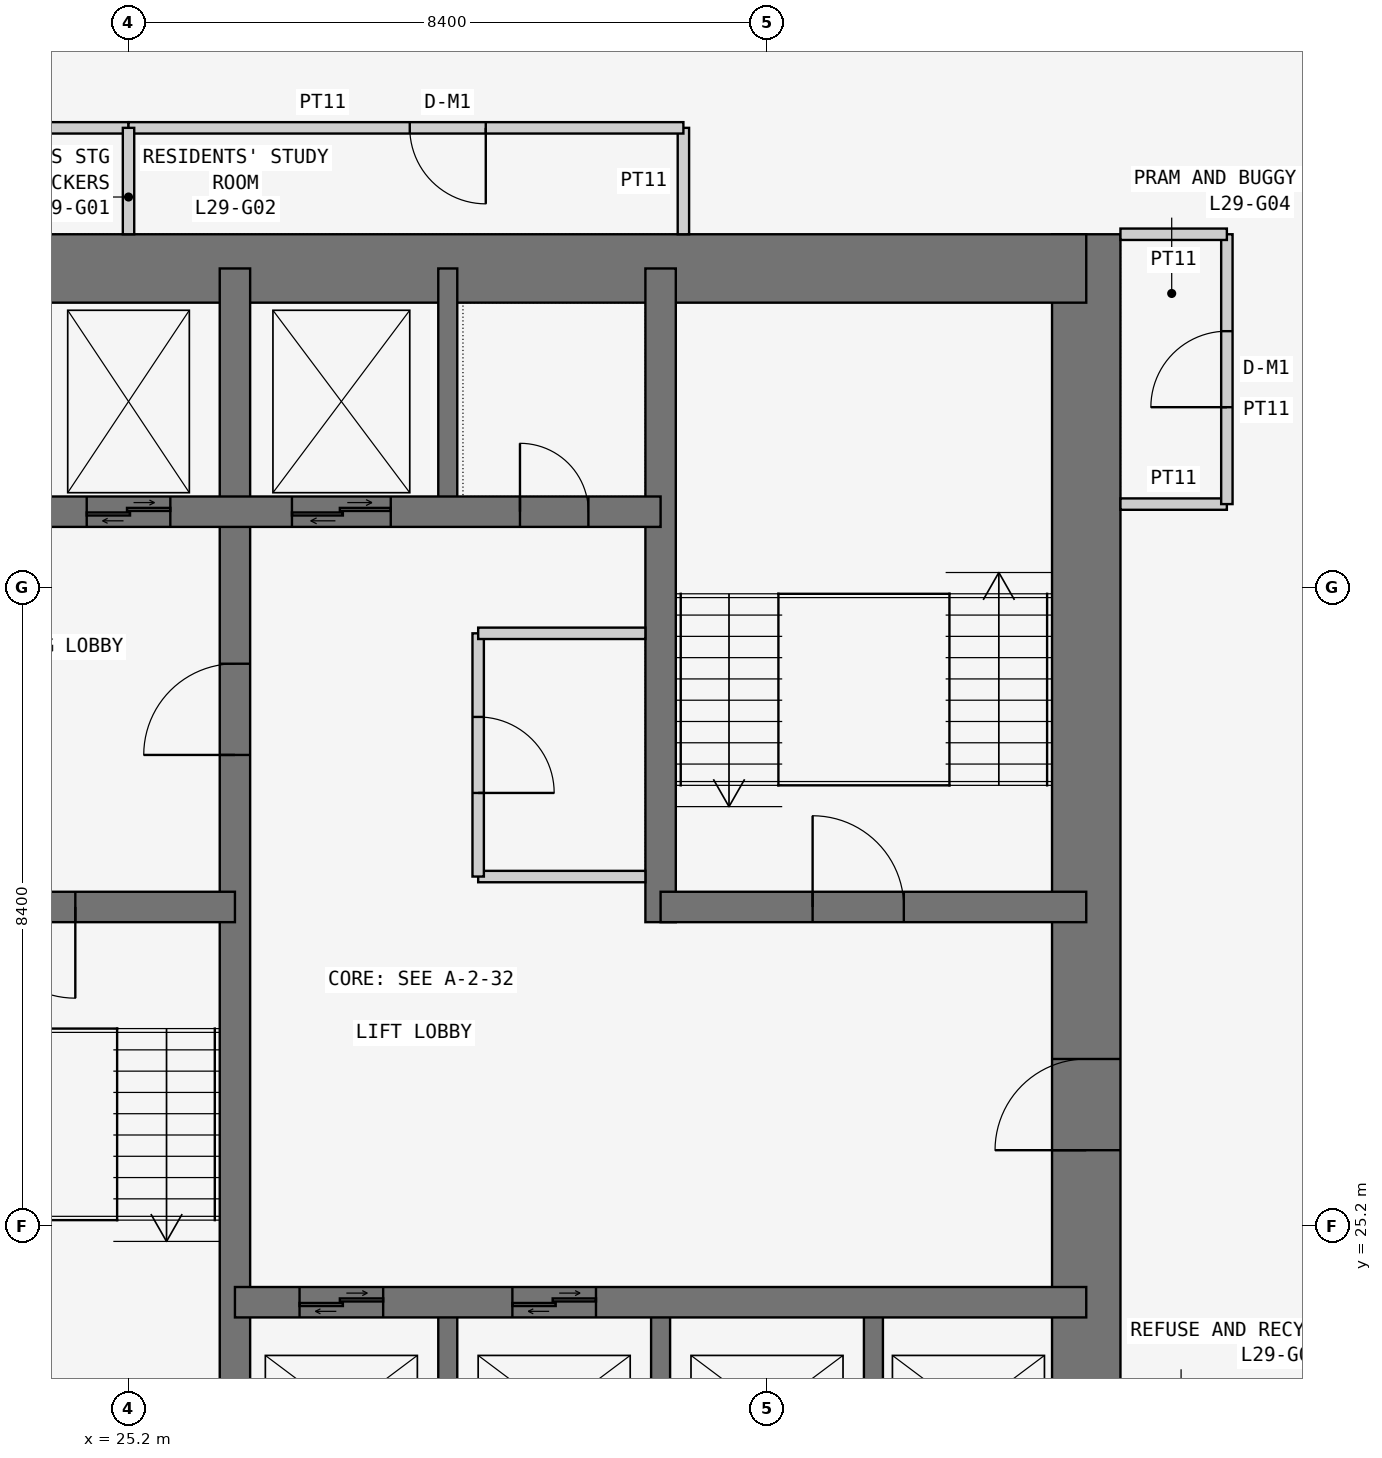
"""IFC4 building model, lengths in metres.
Left out: names, types, materials, properties, quantities, classifications, styles, units other than length and angle.
Written with IfcOpenShell. Run it as: python <this file> out.ifc"""

import sys

from ifc_helpers import new_model, si_unit, direction, frame, frame_2d, origin, place, context, subcontext, project, spatial, rectangle, extrude, element, fill, save


model = new_model("IFC4")
c1 = context("Model", 3, precision=1e-05, world=origin(), true_north=direction((0.0, 1.0)))
c2 = subcontext(c1, "Body", "Model", "MODEL_VIEW")
j1 = project(units=[si_unit("LENGTHUNIT", "METRE"), si_unit("PLANEANGLEUNIT", "RADIAN")], contexts=[c1])
p1 = place(None, origin())
s1 = spatial("IfcSite", under=j1, at=p1, CompositionType="ELEMENT")
p2 = place(p1, origin())
s2 = spatial("IfcBuilding", under=s1, at=p2, CompositionType="ELEMENT")
p3 = place(p2, frame((0.0, 0.0, 116.1)))
s3 = spatial("IfcBuildingStorey", under=s2, at=p3, CompositionType="ELEMENT", Elevation=116.1)
p4 = place(p3, frame((37.8, 21.0, 0.0), z_axis=(0.0, 0.0, 1.0), x_axis=(0.0, 1.0, 0.0)))
e1 = element("IfcWall", 1, at=p4, inside=s3, PredefinedType="SHEAR", context=c2, shape_type="SweptSolid", body=[
    extrude(rectangle(XDim=17.25, YDim=0.9, at=frame_2d((8.625, 0.0))), origin(), (0.0, 0.0, 1.0), 3.6),
])
p5 = place(p4, frame((5.2, 0.0, 0.0)))
e2 = element("IfcOpeningElement", 2, at=p5, cuts=e1, PredefinedType="OPENING", context=c2, shape_type="SweptSolid", body=[
    extrude(rectangle(XDim=1.2, YDim=2.1, at=frame_2d((0.6, 1.05))), frame((0.0, 0.46, 0.0), z_axis=(0.0, -1.0, 0.0), x_axis=(1.0, 0.0, 0.0)), (0.0, 0.0, 1.0), 0.92),
])
p6 = place(p3, frame((37.8, 37.8, 0.0), z_axis=(0.0, 0.0, 1.0), x_axis=(-1.0, 0.0, 0.0)))
e3 = element("IfcWall", 3, at=p6, inside=s3, PredefinedType="SHEAR", context=c2, shape_type="SweptSolid", body=[
    extrude(rectangle(XDim=17.25, YDim=0.9, at=frame_2d((8.625, 0.0))), origin(), (0.0, 0.0, 1.0), 3.6),
])
p7 = place(p3, frame((26.6, 21.0, 0.0), z_axis=(0.0, 0.0, 1.0), x_axis=(0.0, 1.0, 0.0)))
e4 = element("IfcWall", 4, at=p7, inside=s3, PredefinedType="SHEAR", context=c2, shape_type="SweptSolid", body=[
    extrude(rectangle(XDim=16.8, YDim=0.4, at=frame_2d((8.4, 0.0))), origin(), (0.0, 0.0, 1.0), 3.6),
])
p8 = place(p7, frame((10.4, 0.0, 0.0)))
e5 = element("IfcOpeningElement", 5, at=p8, cuts=e4, PredefinedType="OPENING", context=c2, shape_type="SweptSolid", body=[
    extrude(rectangle(XDim=1.2, YDim=2.1, at=frame_2d((0.6, 1.05))), frame((0.0, 0.21, 0.0), z_axis=(0.0, -1.0, 0.0), x_axis=(1.0, 0.0, 0.0)), (0.0, 0.0, 1.0), 0.42),
])
p9 = place(p3, frame((21.0, 29.4, 0.0), z_axis=(0.0, 0.0, 1.0), x_axis=(1.0, 0.0, 0.0)))
e6 = element("IfcWall", 6, at=p9, inside=s3, PredefinedType="SHEAR", context=c2, shape_type="SweptSolid", body=[
    extrude(rectangle(XDim=5.6, YDim=0.4, at=frame_2d((2.8, 0.0))), origin(), (0.0, 0.0, 1.0), 3.6),
])
p10 = place(p9, frame((2.3, 0.0, 0.0)))
e7 = element("IfcOpeningElement", 7, at=p10, cuts=e6, PredefinedType="OPENING", context=c2, shape_type="SweptSolid", body=[
    extrude(rectangle(XDim=1.2, YDim=2.1, at=frame_2d((0.6, 1.05))), frame((0.0, 0.21, 0.0), z_axis=(0.0, -1.0, 0.0), x_axis=(1.0, 0.0, 0.0)), (0.0, 0.0, 1.0), 0.42),
])
p11 = place(p3, frame((21.0, 34.6, 0.0), z_axis=(0.0, 0.0, 1.0), x_axis=(1.0, 0.0, 0.0)))
e8 = element("IfcWall", 8, at=p11, inside=s3, PredefinedType="SHEAR", context=c2, shape_type="SweptSolid", body=[
    extrude(rectangle(XDim=11.2, YDim=0.4, at=frame_2d((5.6, 0.0))), origin(), (0.0, 0.0, 1.0), 3.6),
])
p12 = place(p11, frame((9.35, 0.0, 0.0)))
e9 = element("IfcOpeningElement", 9, at=p12, cuts=e8, PredefinedType="OPENING", context=c2, shape_type="SweptSolid", body=[
    extrude(rectangle(XDim=0.9, YDim=2.1, at=frame_2d((0.45, 1.05))), frame((0.0, 0.21, 0.0), z_axis=(0.0, -1.0, 0.0), x_axis=(1.0, 0.0, 0.0)), (0.0, 0.0, 1.0), 0.42),
])
p13 = place(p11, frame((1.0, 0.0, 0.0)))
e10 = element("IfcOpeningElement", 10, at=p13, cuts=e8, PredefinedType="OPENING", context=c2, shape_type="SweptSolid", body=[
    extrude(rectangle(XDim=1.1, YDim=2.1, at=frame_2d((0.55, 1.05))), frame((0.0, 0.21, 0.0), z_axis=(0.0, -1.0, 0.0), x_axis=(1.0, 0.0, 0.0)), (0.0, 0.0, 1.0), 0.42),
])
p14 = place(p11, frame((3.65, 0.0, 0.0)))
e11 = element("IfcOpeningElement", 11, at=p14, cuts=e8, PredefinedType="OPENING", context=c2, shape_type="SweptSolid", body=[
    extrude(rectangle(XDim=1.1, YDim=2.1, at=frame_2d((0.55, 1.05))), frame((0.0, 0.21, 0.0), z_axis=(0.0, -1.0, 0.0), x_axis=(1.0, 0.0, 0.0)), (0.0, 0.0, 1.0), 0.42),
])
p15 = place(p11, frame((6.35, 0.0, 0.0)))
e12 = element("IfcOpeningElement", 12, at=p15, cuts=e8, PredefinedType="OPENING", context=c2, shape_type="SweptSolid", body=[
    extrude(rectangle(XDim=1.3, YDim=2.1, at=frame_2d((0.65, 1.05))), frame((0.0, 0.21, 0.0), z_axis=(0.0, -1.0, 0.0), x_axis=(1.0, 0.0, 0.0)), (0.0, 0.0, 1.0), 0.42),
])
p16 = place(p3, frame((26.6, 24.2, 0.0), z_axis=(0.0, 0.0, 1.0), x_axis=(1.0, 0.0, 0.0)))
e13 = element("IfcWall", 13, at=p16, inside=s3, PredefinedType="SHEAR", context=c2, shape_type="SweptSolid", body=[
    extrude(rectangle(XDim=11.2, YDim=0.4, at=frame_2d((5.6, 0.0))), origin(), (0.0, 0.0, 1.0), 3.6),
])
p17 = place(p16, frame((0.85, 0.0, 0.0)))
e14 = element("IfcOpeningElement", 14, at=p17, cuts=e13, PredefinedType="OPENING", context=c2, shape_type="SweptSolid", body=[
    extrude(rectangle(XDim=1.1, YDim=2.1, at=frame_2d((0.55, 1.05))), frame((0.0, 0.21, 0.0), z_axis=(0.0, -1.0, 0.0), x_axis=(1.0, 0.0, 0.0)), (0.0, 0.0, 1.0), 0.42),
])
p18 = place(p16, frame((3.65, 0.0, 0.0)))
e15 = element("IfcOpeningElement", 15, at=p18, cuts=e13, PredefinedType="OPENING", context=c2, shape_type="SweptSolid", body=[
    extrude(rectangle(XDim=1.1, YDim=2.1, at=frame_2d((0.55, 1.05))), frame((0.0, 0.21, 0.0), z_axis=(0.0, -1.0, 0.0), x_axis=(1.0, 0.0, 0.0)), (0.0, 0.0, 1.0), 0.42),
])
p19 = place(p3, frame((32.2, 29.2, 0.0), z_axis=(0.0, 0.0, 1.0), x_axis=(0.0, 1.0, 0.0)))
e16 = element("IfcWall", 16, at=p19, inside=s3, PredefinedType="SHEAR", context=c2, shape_type="SweptSolid", body=[
    extrude(rectangle(XDim=8.6, YDim=0.4, at=frame_2d((4.3, 0.0))), origin(), (0.0, 0.0, 1.0), 3.6),
])
p20 = place(p3, frame((32.2, 29.4, 0.0), z_axis=(0.0, 0.0, 1.0), x_axis=(1.0, 0.0, 0.0)))
e17 = element("IfcWall", 17, at=p20, inside=s3, PredefinedType="SHEAR", context=c2, shape_type="SweptSolid", body=[
    extrude(rectangle(XDim=5.6, YDim=0.4, at=frame_2d((2.8, 0.0))), origin(), (0.0, 0.0, 1.0), 3.6),
])
p21 = place(p20, frame((2.0, 0.0, 0.0)))
e18 = element("IfcOpeningElement", 18, at=p21, cuts=e17, PredefinedType="OPENING", context=c2, shape_type="SweptSolid", body=[
    extrude(rectangle(XDim=1.2, YDim=2.1, at=frame_2d((0.6, 1.05))), frame((0.0, 0.21, 0.0), z_axis=(0.0, -1.0, 0.0), x_axis=(1.0, 0.0, 0.0)), (0.0, 0.0, 1.0), 0.42),
])
for number, where, z_axis, x_axis in (
    (19, (29.4, 21.0, 0.0), (0.0, 0.0, 1.0), (0.0, 1.0, 0.0)),
    (20, (32.2, 21.0, 0.0), (0.0, 0.0, 1.0), (0.0, 1.0, 0.0)),
    (21, (35.0, 21.0, 0.0), (0.0, 0.0, 1.0), (0.0, 1.0, 0.0)),
    (22, (29.4, 34.6, 0.0), (0.0, 0.0, 1.0), (0.0, 1.0, 0.0)),
):
    element("IfcWall", number, at=place(p3, frame(where, z_axis=z_axis, x_axis=x_axis)), inside=s3, PredefinedType="SHEAR", context=c2, shape_type="SweptSolid", body=[
        extrude(rectangle(XDim=3.2, YDim=0.25, at=frame_2d((1.6, 0.0))), origin(), (0.0, 0.0, 1.0), 3.6),
    ])
p22 = place(p3, frame((25.2, 39.65, 0.0), z_axis=(0.0, 0.0, 1.0), x_axis=(-1.0, 0.0, 0.0)))
e23 = element("IfcWall", 23, at=p22, inside=s3, PredefinedType="PARTITIONING", context=c2, shape_type="SweptSolid", body=[
    extrude(rectangle(XDim=4.65, YDim=0.15, at=frame_2d((2.325, 0.0))), origin(), (0.0, 0.0, 1.0), 3.45),
])
p23 = place(p22, frame((2.375, 0.0, 0.0)))
e24 = element("IfcOpeningElement", 24, at=p23, cuts=e23, PredefinedType="OPENING", context=c2, shape_type="SweptSolid", body=[
    extrude(rectangle(XDim=1.0, YDim=2.1, at=frame_2d((0.5, 1.05))), frame((0.0, 0.085, 0.0), z_axis=(0.0, -1.0, 0.0), x_axis=(1.0, 0.0, 0.0)), (0.0, 0.0, 1.0), 0.17),
])
p24 = place(p3, frame((32.5, 38.25, 0.0), z_axis=(0.0, 0.0, 1.0), x_axis=(0.0, 1.0, 0.0)))
e25 = element("IfcWall", 25, at=p24, inside=s3, PredefinedType="PARTITIONING", context=c2, shape_type="SweptSolid", body=[
    extrude(rectangle(XDim=1.4, YDim=0.15, at=frame_2d((0.7, 0.0))), origin(), (0.0, 0.0, 1.0), 3.45),
])
p25 = place(p3, frame((32.5, 39.65, 0.0), z_axis=(0.0, 0.0, 1.0), x_axis=(-1.0, 0.0, 0.0)))
e26 = element("IfcWall", 26, at=p25, inside=s3, PredefinedType="PARTITIONING", context=c2, shape_type="SweptSolid", body=[
    extrude(rectangle(XDim=7.3, YDim=0.15, at=frame_2d((3.65, 0.0))), origin(), (0.0, 0.0, 1.0), 3.45),
])
p26 = place(p25, frame((2.6, 0.0, 0.0)))
e27 = element("IfcOpeningElement", 27, at=p26, cuts=e26, PredefinedType="OPENING", context=c2, shape_type="SweptSolid", body=[
    extrude(rectangle(XDim=1.0, YDim=2.1, at=frame_2d((0.5, 1.05))), frame((0.0, 0.085, 0.0), z_axis=(0.0, -1.0, 0.0), x_axis=(1.0, 0.0, 0.0)), (0.0, 0.0, 1.0), 0.17),
])
p27 = place(p3, frame((38.25, 34.7, 0.0), z_axis=(0.0, 0.0, 1.0), x_axis=(1.0, 0.0, 0.0)))
e28 = element("IfcWall", 28, at=p27, inside=s3, PredefinedType="PARTITIONING", context=c2, shape_type="SweptSolid", body=[
    extrude(rectangle(XDim=1.4, YDim=0.15, at=frame_2d((0.7, 0.0))), origin(), (0.0, 0.0, 1.0), 3.45),
])
p28 = place(p3, frame((39.65, 34.7, 0.0), z_axis=(0.0, 0.0, 1.0), x_axis=(0.0, 1.0, 0.0)))
e29 = element("IfcWall", 29, at=p28, inside=s3, PredefinedType="PARTITIONING", context=c2, shape_type="SweptSolid", body=[
    extrude(rectangle(XDim=3.55, YDim=0.15, at=frame_2d((1.775, 0.0))), origin(), (0.0, 0.0, 1.0), 3.45),
])
p29 = place(p28, frame((1.275, 0.0, 0.0)))
e30 = element("IfcOpeningElement", 30, at=p29, cuts=e29, PredefinedType="OPENING", context=c2, shape_type="SweptSolid", body=[
    extrude(rectangle(XDim=1.0, YDim=2.1, at=frame_2d((0.5, 1.05))), frame((0.0, 0.085, 0.0), z_axis=(0.0, -1.0, 0.0), x_axis=(1.0, 0.0, 0.0)), (0.0, 0.0, 1.0), 0.17),
])
p30 = place(p3, frame((39.65, 38.25, 0.0), z_axis=(0.0, 0.0, 1.0), x_axis=(-1.0, 0.0, 0.0)))
e31 = element("IfcWall", 31, at=p30, inside=s3, PredefinedType="PARTITIONING", context=c2, shape_type="SweptSolid", body=[
    extrude(rectangle(XDim=1.4, YDim=0.15, at=frame_2d((0.7, 0.0))), origin(), (0.0, 0.0, 1.0), 3.45),
])
p31 = place(p3, frame((25.2, 38.25, 0.0), z_axis=(0.0, 0.0, 1.0), x_axis=(0.0, 1.0, 0.0)))
e32 = element("IfcWall", 32, at=p31, inside=s3, PredefinedType="PARTITIONING", context=c2, shape_type="SweptSolid", body=[
    extrude(rectangle(XDim=1.4, YDim=0.15, at=frame_2d((0.7, 0.0))), origin(), (0.0, 0.0, 1.0), 2.767),
])
p32 = place(p3, frame((32.0, 29.8, 0.0), z_axis=(0.0, 0.0, 1.0), x_axis=(-1.0, 0.0, 0.0)))
e33 = element("IfcWall", 33, at=p32, inside=s3, PredefinedType="PARTITIONING", context=c2, shape_type="SweptSolid", body=[
    extrude(rectangle(XDim=2.2, YDim=0.15, at=frame_2d((1.1, 0.0))), origin(), (0.0, 0.0, 1.0), 3.45),
])
p33 = place(p3, frame((29.8, 29.8, 0.0), z_axis=(0.0, 0.0, 1.0), x_axis=(0.0, 1.0, 0.0)))
e34 = element("IfcWall", 34, at=p33, inside=s3, PredefinedType="PARTITIONING", context=c2, shape_type="SweptSolid", body=[
    extrude(rectangle(XDim=3.2, YDim=0.15, at=frame_2d((1.6, 0.0))), origin(), (0.0, 0.0, 1.0), 3.45),
])
p34 = place(p33, frame((1.1, 0.0, 0.0)))
e35 = element("IfcOpeningElement", 35, at=p34, cuts=e34, PredefinedType="OPENING", context=c2, shape_type="SweptSolid", body=[
    extrude(rectangle(XDim=1.0, YDim=2.1, at=frame_2d((0.5, 1.05))), frame((0.0, 0.085, 0.0), z_axis=(0.0, -1.0, 0.0), x_axis=(1.0, 0.0, 0.0)), (0.0, 0.0, 1.0), 0.17),
])
p35 = place(p3, frame((29.8, 33.0, 0.0), z_axis=(0.0, 0.0, 1.0), x_axis=(1.0, 0.0, 0.0)))
e36 = element("IfcWall", 36, at=p35, inside=s3, PredefinedType="PARTITIONING", context=c2, shape_type="SweptSolid", body=[
    extrude(rectangle(XDim=2.2, YDim=0.15, at=frame_2d((1.1, 0.0))), origin(), (0.0, 0.0, 1.0), 3.45),
])
p36 = place(p26, origin())
e37 = element("IfcDoor", 37, at=p36, inside=s3, OperationType="SINGLE_SWING_LEFT", PredefinedType="DOOR", context=c2, shape_type="SweptSolid", body=[
    extrude(rectangle(XDim=1.0, YDim=2.1, at=frame_2d((0.5, 1.05))), frame((0.0, 0.025, 0.0), z_axis=(0.0, -1.0, 0.0), x_axis=(1.0, 0.0, 0.0)), (0.0, 0.0, 1.0), 0.05),
])
fill(e27, e37)
p37 = place(p29, origin())
e38 = element("IfcDoor", 38, at=p37, inside=s3, OperationType="SINGLE_SWING_LEFT", PredefinedType="DOOR", context=c2, shape_type="SweptSolid", body=[
    extrude(rectangle(XDim=1.0, YDim=2.1, at=frame_2d((0.5, 1.05))), frame((0.0, 0.025, 0.0), z_axis=(0.0, -1.0, 0.0), x_axis=(1.0, 0.0, 0.0)), (0.0, 0.0, 1.0), 0.05),
])
fill(e30, e38)
p38 = place(p10, frame((1.2, 0.0, 0.0), z_axis=(0.0, 0.0, 1.0), x_axis=(-1.0, 0.0, 0.0)))
e39 = element("IfcDoor", 39, at=p38, inside=s3, OperationType="SINGLE_SWING_LEFT", PredefinedType="DOOR", context=c2, shape_type="SweptSolid", body=[
    extrude(rectangle(XDim=1.2, YDim=2.1, at=frame_2d((0.6, 1.05))), frame((0.0, 0.025, 0.0), z_axis=(0.0, -1.0, 0.0), x_axis=(1.0, 0.0, 0.0)), (0.0, 0.0, 1.0), 0.05),
])
fill(e7, e39)
p39 = place(p8, origin())
e40 = element("IfcDoor", 40, at=p39, inside=s3, OperationType="SINGLE_SWING_LEFT", PredefinedType="DOOR", context=c2, shape_type="SweptSolid", body=[
    extrude(rectangle(XDim=1.2, YDim=2.1, at=frame_2d((0.6, 1.05))), frame((0.0, 0.025, 0.0), z_axis=(0.0, -1.0, 0.0), x_axis=(1.0, 0.0, 0.0)), (0.0, 0.0, 1.0), 0.05),
])
fill(e5, e40)
p40 = place(p5, origin())
e41 = element("IfcDoor", 41, at=p40, inside=s3, OperationType="SINGLE_SWING_LEFT", PredefinedType="DOOR", context=c2, shape_type="SweptSolid", body=[
    extrude(rectangle(XDim=1.2, YDim=2.1, at=frame_2d((0.6, 1.05))), frame((0.0, 0.025, 0.0), z_axis=(0.0, -1.0, 0.0), x_axis=(1.0, 0.0, 0.0)), (0.0, 0.0, 1.0), 0.05),
])
fill(e2, e41)
p41 = place(p21, origin())
e42 = element("IfcDoor", 42, at=p41, inside=s3, OperationType="SINGLE_SWING_LEFT", PredefinedType="DOOR", context=c2, shape_type="SweptSolid", body=[
    extrude(rectangle(XDim=1.2, YDim=2.1, at=frame_2d((0.6, 1.05))), frame((0.0, 0.025, 0.0), z_axis=(0.0, -1.0, 0.0), x_axis=(1.0, 0.0, 0.0)), (0.0, 0.0, 1.0), 0.05),
])
fill(e18, e42)
p42 = place(p12, origin())
e43 = element("IfcDoor", 43, at=p42, inside=s3, OperationType="SINGLE_SWING_LEFT", PredefinedType="DOOR", context=c2, shape_type="SweptSolid", body=[
    extrude(rectangle(XDim=0.9, YDim=2.1, at=frame_2d((0.45, 1.05))), frame((0.0, 0.025, 0.0), z_axis=(0.0, -1.0, 0.0), x_axis=(1.0, 0.0, 0.0)), (0.0, 0.0, 1.0), 0.05),
])
fill(e9, e43)
p43 = place(p34, frame((1.0, 0.0, 0.0), z_axis=(0.0, 0.0, 1.0), x_axis=(-1.0, 0.0, 0.0)))
e44 = element("IfcDoor", 44, at=p43, inside=s3, OperationType="SINGLE_SWING_RIGHT", PredefinedType="DOOR", context=c2, shape_type="SweptSolid", body=[
    extrude(rectangle(XDim=1.0, YDim=2.1, at=frame_2d((0.5, 1.05))), frame((0.0, 0.025, 0.0), z_axis=(0.0, -1.0, 0.0), x_axis=(1.0, 0.0, 0.0)), (0.0, 0.0, 1.0), 0.05),
])
fill(e35, e44)
p44 = place(p17, origin())
e45 = element("IfcDoor", 45, at=p44, inside=s3, OperationType="DOUBLE_DOOR_SLIDING", PredefinedType="DOOR", context=c2, shape_type="SweptSolid", body=[
    extrude(rectangle(XDim=1.1, YDim=2.1, at=frame_2d((0.55, 1.05))), frame((0.0, 0.025, 0.0), z_axis=(0.0, -1.0, 0.0), x_axis=(1.0, 0.0, 0.0)), (0.0, 0.0, 1.0), 0.05),
])
fill(e14, e45)
p45 = place(p18, origin())
e46 = element("IfcDoor", 46, at=p45, inside=s3, OperationType="DOUBLE_DOOR_SLIDING", PredefinedType="DOOR", context=c2, shape_type="SweptSolid", body=[
    extrude(rectangle(XDim=1.1, YDim=2.1, at=frame_2d((0.55, 1.05))), frame((0.0, 0.025, 0.0), z_axis=(0.0, -1.0, 0.0), x_axis=(1.0, 0.0, 0.0)), (0.0, 0.0, 1.0), 0.05),
])
fill(e15, e46)
p46 = place(p14, origin())
e47 = element("IfcDoor", 47, at=p46, inside=s3, OperationType="DOUBLE_DOOR_SLIDING", PredefinedType="DOOR", context=c2, shape_type="SweptSolid", body=[
    extrude(rectangle(XDim=1.1, YDim=2.1, at=frame_2d((0.55, 1.05))), frame((0.0, 0.025, 0.0), z_axis=(0.0, -1.0, 0.0), x_axis=(1.0, 0.0, 0.0)), (0.0, 0.0, 1.0), 0.05),
])
fill(e11, e47)
p47 = place(p15, origin())
e48 = element("IfcDoor", 48, at=p47, inside=s3, OperationType="DOUBLE_DOOR_SLIDING", PredefinedType="DOOR", context=c2, shape_type="SweptSolid", body=[
    extrude(rectangle(XDim=1.3, YDim=2.1, at=frame_2d((0.65, 1.05))), frame((0.0, 0.025, 0.0), z_axis=(0.0, -1.0, 0.0), x_axis=(1.0, 0.0, 0.0)), (0.0, 0.0, 1.0), 0.05),
])
fill(e12, e48)
save(model, sys.argv[1])
